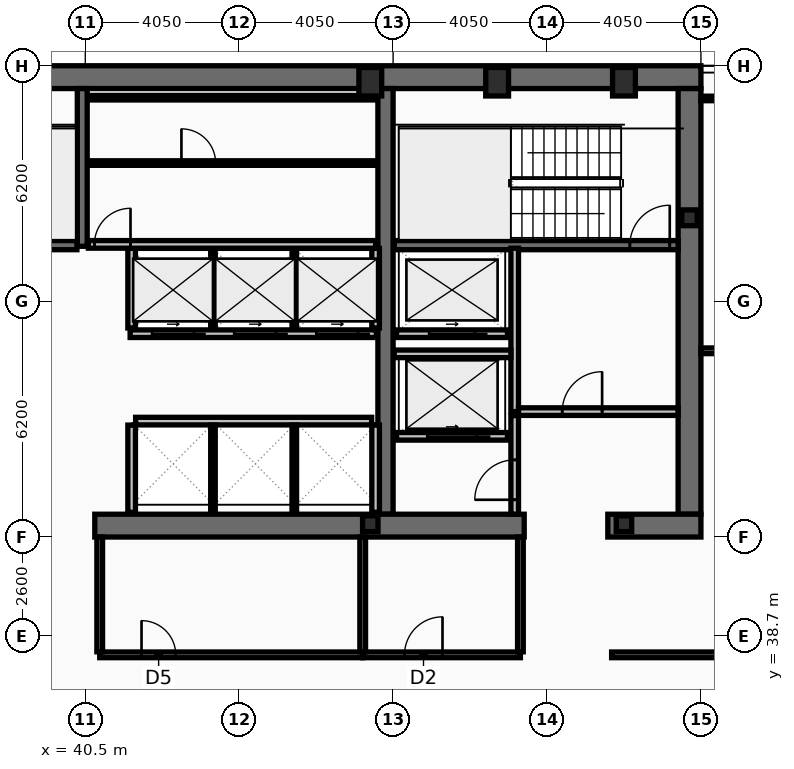
"""IFC4 building model, lengths in metres.
Left out: names, types, materials, properties, quantities, classifications, styles, units other than length and angle.
Written with IfcOpenShell. Run it as: python <this file> out.ifc"""

import sys

from ifc_helpers import new_model, si_unit, direction, frame, frame_2d, origin, origin_2d, place, context, subcontext, project, spatial, rectangle, hollow_rectangle, i_section, extrude, element, fill, save


model = new_model("IFC4")
c1 = context("Model", 3, precision=1e-05, world=origin(), true_north=direction((0.0, 1.0)))
c2 = subcontext(c1, "Body", "Model", "MODEL_VIEW")
j1 = project(units=[si_unit("LENGTHUNIT", "METRE"), si_unit("PLANEANGLEUNIT", "RADIAN")], contexts=[c1])
p1 = place(None, origin())
s1 = spatial("IfcSite", under=j1, at=p1, CompositionType="ELEMENT")
p2 = place(p1, origin())
s2 = spatial("IfcBuilding", under=s1, at=p2, CompositionType="ELEMENT")
p3 = place(p2, frame((0.0, 0.0, 261.8)))
s3 = spatial("IfcBuildingStorey", under=s2, at=p3, CompositionType="ELEMENT", Elevation=261.8)
p4 = place(p3, frame((16.2, 53.4, 0.0), z_axis=(0.0, 0.0, 1.0), x_axis=(1.0, 0.0, 0.0)))
e1 = element("IfcWall", 1, at=p4, inside=s3, PredefinedType="SHEAR", context=c2, shape_type="SweptSolid", body=[
    extrude(rectangle(XDim=40.5, YDim=0.6, at=frame_2d((20.25, 0.0))), origin(), (0.0, 0.0, 1.0), 3.4),
])
p5 = place(p3, frame((56.4, 53.1, 0.0), z_axis=(0.0, 0.0, 1.0), x_axis=(0.0, -1.0, 0.0)))
e2 = element("IfcWall", 2, at=p5, inside=s3, PredefinedType="SHEAR", context=c2, shape_type="SweptSolid", body=[
    extrude(rectangle(XDim=11.2, YDim=0.6, at=frame_2d((5.6, 0.0))), origin(), (0.0, 0.0, 1.0), 3.4),
])
p6 = place(p3, frame((48.4, 41.9, 0.0), z_axis=(0.0, 0.0, 1.0), x_axis=(0.0, 1.0, 0.0)))
e3 = element("IfcWall", 3, at=p6, inside=s3, PredefinedType="SHEAR", context=c2, shape_type="SweptSolid", body=[
    extrude(rectangle(XDim=11.2, YDim=0.4, at=frame_2d((5.6, 0.0))), origin(), (0.0, 0.0, 1.0), 3.4),
])
p7 = place(p3, frame((52.05, 41.6, 0.0), z_axis=(0.0, 0.0, 1.0), x_axis=(-1.0, 0.0, 0.0)))
e4 = element("IfcWall", 4, at=p7, inside=s3, PredefinedType="SHEAR", context=c2, shape_type="SweptSolid", body=[
    extrude(rectangle(XDim=11.3, YDim=0.6, at=frame_2d((5.65, 0.0))), origin(), (0.0, 0.0, 1.0), 3.4),
])
p8 = place(p3, frame((56.7, 41.6, 0.0), z_axis=(0.0, 0.0, 1.0), x_axis=(-1.0, 0.0, 0.0)))
e5 = element("IfcWall", 5, at=p8, inside=s3, PredefinedType="SHEAR", context=c2, shape_type="SweptSolid", body=[
    extrude(rectangle(XDim=2.45, YDim=0.6, at=frame_2d((1.225, 0.0))), origin(), (0.0, 0.0, 1.0), 3.4),
])
p9 = place(p3, frame((40.42, 48.95, 0.0), z_axis=(0.0, 0.0, 1.0), x_axis=(0.0, 1.0, 0.0)))
e6 = element("IfcWall", 6, at=p9, inside=s3, PredefinedType="SHEAR", context=c2, shape_type="SweptSolid", body=[
    extrude(rectangle(XDim=4.15, YDim=0.26, at=frame_2d((2.075, 0.0))), origin(), (0.0, 0.0, 1.0), 3.4),
])
p10 = place(p3, frame((48.63, 48.98, 0.0), z_axis=(0.0, 0.0, 1.0), x_axis=(1.0, 0.0, 0.0)))
e7 = element("IfcWall", 7, at=p10, inside=s3, PredefinedType="SHEAR", context=c2, shape_type="SweptSolid", body=[
    extrude(rectangle(XDim=7.47, YDim=0.24, at=frame_2d((3.735, 0.0))), origin(), (0.0, 0.0, 1.0), 3.4),
])
p11 = place(p10, frame((6.2, 0.0, 0.0)))
e8 = element("IfcOpeningElement", 8, at=p11, cuts=e7, PredefinedType="OPENING", context=c2, shape_type="SweptSolid", body=[
    extrude(rectangle(XDim=1.05, YDim=2.15, at=frame_2d((0.525, 1.075))), frame((0.0, 0.13, 0.0), z_axis=(0.0, -1.0, 0.0), x_axis=(1.0, 0.0, 0.0)), (0.0, 0.0, 1.0), 0.26),
])
p12 = place(p3, frame((32.72, 48.98, 0.0), z_axis=(0.0, 0.0, 1.0), x_axis=(1.0, 0.0, 0.0)))
e9 = element("IfcWall", 9, at=p12, inside=s3, PredefinedType="SHEAR", context=c2, shape_type="SweptSolid", body=[
    extrude(rectangle(XDim=7.56, YDim=0.24, at=frame_2d((3.78, 0.0))), origin(), (0.0, 0.0, 1.0), 3.4),
])
p13 = place(p12, frame((0.22, 0.0, 0.0)))
e10 = element("IfcOpeningElement", 10, at=p13, cuts=e9, PredefinedType="OPENING", context=c2, shape_type="SweptSolid", body=[
    extrude(rectangle(XDim=1.05, YDim=2.15, at=frame_2d((0.525, 1.075))), frame((0.0, 0.13, 0.0), z_axis=(0.0, -1.0, 0.0), x_axis=(1.0, 0.0, 0.0)), (0.0, 0.0, 1.0), 0.26),
])
for number, where, z_axis, x_axis in (
    (11, (48.0, 53.28, 0.0), (0.0, 0.0, 1.0), (1.0, 0.0, 0.0)),
    (12, (51.337, 53.28, 0.0), (0.0, 0.0, 1.0), (1.0, 0.0, 0.0)),
    (13, (54.675, 53.28, 0.0), (0.0, 0.0, 1.0), (1.0, 0.0, 0.0)),
):
    element("IfcColumn", number, at=place(p3, frame(where, z_axis=z_axis, x_axis=x_axis)), inside=s3, PredefinedType="COLUMN", context=c2, shape_type="SweptSolid", body=[
        extrude(hollow_rectangle(XDim=0.6, YDim=0.75, WallThickness=0.045, at=origin_2d()), origin(), (0.0, 0.0, 1.0), 3.6),
    ])
for number, where, z_axis, x_axis in (
    (14, (56.4, 49.7, 0.0), (0.0, 0.0, 1.0), (1.0, 0.0, 0.0)),
    (15, (48.0, 41.65, 0.0), (0.0, 0.0, 1.0), (1.0, 0.0, 0.0)),
    (16, (54.675, 41.65, 0.0), (0.0, 0.0, 1.0), (1.0, 0.0, 0.0)),
):
    element("IfcColumn", number, at=place(p3, frame(where, z_axis=z_axis, x_axis=x_axis)), inside=s3, PredefinedType="COLUMN", context=c2, shape_type="SweptSolid", body=[
        extrude(i_section(OverallWidth=0.406, OverallDepth=0.416, WebThickness=0.03, FlangeThickness=0.048, at=origin_2d()), origin(), (0.0, 0.0, 1.0), 3.6),
    ])
p14 = place(p3, frame((51.61, 43.95, 0.0), z_axis=(0.0, 0.0, 1.0), x_axis=(-1.0, 0.0, 0.0)))
e17 = element("IfcWall", 17, at=p14, inside=s3, PredefinedType="PARTITIONING", context=c2, shape_type="SweptSolid", body=[
    extrude(rectangle(XDim=2.92, YDim=0.2, at=frame_2d((1.46, 0.0))), origin(), (0.0, 0.0, 1.0), 3.4),
])
p15 = place(p14, frame((0.81, 0.0, 0.0)))
e18 = element("IfcOpeningElement", 18, at=p15, cuts=e17, PredefinedType="OPENING", context=c2, shape_type="SweptSolid", body=[
    extrude(rectangle(XDim=1.3, YDim=2.18, at=frame_2d((0.65, 1.09))), frame((0.0, 0.11, 0.0), z_axis=(0.0, -1.0, 0.0), x_axis=(1.0, 0.0, 0.0)), (0.0, 0.0, 1.0), 0.22),
])
p16 = place(p3, frame((51.61, 46.65, 0.0), z_axis=(0.0, 0.0, 1.0), x_axis=(-1.0, 0.0, 0.0)))
e19 = element("IfcWall", 19, at=p16, inside=s3, PredefinedType="PARTITIONING", context=c2, shape_type="SweptSolid", body=[
    extrude(rectangle(XDim=2.92, YDim=0.2, at=frame_2d((1.46, 0.0))), origin(), (0.0, 0.0, 1.0), 3.4),
])
p17 = place(p16, frame((0.86, 0.0, 0.0)))
e20 = element("IfcOpeningElement", 20, at=p17, cuts=e19, PredefinedType="OPENING", context=c2, shape_type="SweptSolid", body=[
    extrude(rectangle(XDim=1.2, YDim=2.18, at=frame_2d((0.6, 1.09))), frame((0.0, 0.11, 0.0), z_axis=(0.0, -1.0, 0.0), x_axis=(1.0, 0.0, 0.0)), (0.0, 0.0, 1.0), 0.22),
])
p18 = place(p3, frame((48.16, 46.65, 0.0), z_axis=(0.0, 0.0, 1.0), x_axis=(-1.0, 0.0, 0.0)))
e21 = element("IfcWall", 21, at=p18, inside=s3, PredefinedType="PARTITIONING", context=c2, shape_type="SweptSolid", body=[
    extrude(rectangle(XDim=6.48, YDim=0.2, at=frame_2d((3.24, 0.0))), origin(), (0.0, 0.0, 1.0), 3.4),
])
p19 = place(p18, frame((4.8, 0.0, 0.0)))
e22 = element("IfcOpeningElement", 22, at=p19, cuts=e21, PredefinedType="OPENING", context=c2, shape_type="SweptSolid", body=[
    extrude(rectangle(XDim=1.1, YDim=2.18, at=frame_2d((0.55, 1.09))), frame((0.0, 0.11, 0.0), z_axis=(0.0, -1.0, 0.0), x_axis=(1.0, 0.0, 0.0)), (0.0, 0.0, 1.0), 0.22),
])
p20 = place(p18, frame((2.64, 0.0, 0.0)))
e23 = element("IfcOpeningElement", 23, at=p20, cuts=e21, PredefinedType="OPENING", context=c2, shape_type="SweptSolid", body=[
    extrude(rectangle(XDim=1.1, YDim=2.18, at=frame_2d((0.55, 1.09))), frame((0.0, 0.11, 0.0), z_axis=(0.0, -1.0, 0.0), x_axis=(1.0, 0.0, 0.0)), (0.0, 0.0, 1.0), 0.22),
])
p21 = place(p18, frame((0.48, 0.0, 0.0)))
e24 = element("IfcOpeningElement", 24, at=p21, cuts=e21, PredefinedType="OPENING", context=c2, shape_type="SweptSolid", body=[
    extrude(rectangle(XDim=1.1, YDim=2.18, at=frame_2d((0.55, 1.09))), frame((0.0, 0.11, 0.0), z_axis=(0.0, -1.0, 0.0), x_axis=(1.0, 0.0, 0.0)), (0.0, 0.0, 1.0), 0.22),
])
p22 = place(p3, frame((51.8, 44.6, 0.0), z_axis=(0.0, 0.0, 1.0), x_axis=(0.0, 1.0, 0.0)))
e25 = element("IfcWall", 25, at=p22, inside=s3, PredefinedType="PARTITIONING", context=c2, shape_type="SweptSolid", body=[
    extrude(rectangle(XDim=4.3, YDim=0.2, at=frame_2d((2.15, 0.0))), origin(), (0.0, 0.0, 1.0), 3.4),
])
p23 = place(p3, frame((51.9, 44.6, 0.0), z_axis=(0.0, 0.0, 1.0), x_axis=(1.0, 0.0, 0.0)))
e26 = element("IfcWall", 26, at=p23, inside=s3, PredefinedType="PARTITIONING", context=c2, shape_type="SweptSolid", body=[
    extrude(rectangle(XDim=4.2, YDim=0.2, at=frame_2d((2.1, 0.0))), origin(), (0.0, 0.0, 1.0), 3.4),
])
p24 = place(p23, frame((1.15, 0.0, 0.0)))
e27 = element("IfcOpeningElement", 27, at=p24, cuts=e26, PredefinedType="OPENING", context=c2, shape_type="SweptSolid", body=[
    extrude(rectangle(XDim=1.05, YDim=2.15, at=frame_2d((0.525, 1.075))), frame((0.0, 0.11, 0.0), z_axis=(0.0, -1.0, 0.0), x_axis=(1.0, 0.0, 0.0)), (0.0, 0.0, 1.0), 0.22),
])
p25 = place(p3, frame((48.63, 46.12, 0.0), z_axis=(0.0, 0.0, 1.0), x_axis=(1.0, 0.0, 0.0)))
e28 = element("IfcWall", 28, at=p25, inside=s3, PredefinedType="PARTITIONING", context=c2, shape_type="SweptSolid", body=[
    extrude(rectangle(XDim=3.07, YDim=0.2, at=frame_2d((1.535, 0.0))), origin(), (0.0, 0.0, 1.0), 3.4),
])
p26 = place(p3, frame((51.8, 41.9, 0.0), z_axis=(0.0, 0.0, 1.0), x_axis=(0.0, 1.0, 0.0)))
e29 = element("IfcWall", 29, at=p26, inside=s3, PredefinedType="PARTITIONING", context=c2, shape_type="SweptSolid", body=[
    extrude(rectangle(XDim=2.595, YDim=0.2, at=frame_2d((1.298, 0.0))), origin(), (0.0, 0.0, 1.0), 3.4),
])
p27 = place(p26, frame((0.38, 0.0, 0.0)))
e30 = element("IfcOpeningElement", 30, at=p27, cuts=e29, PredefinedType="OPENING", context=c2, shape_type="SweptSolid", body=[
    extrude(rectangle(XDim=1.05, YDim=2.15, at=frame_2d((0.525, 1.075))), frame((0.0, 0.11, 0.0), z_axis=(0.0, -1.0, 0.0), x_axis=(1.0, 0.0, 0.0)), (0.0, 0.0, 1.0), 0.22),
])
for number, where, z_axis, x_axis in (
    (31, (41.72, 46.8, 0.0), (0.0, 0.0, 1.0), (0.0, 1.0, 0.0)),
    (32, (48.14, 46.8, 0.0), (0.0, 0.0, 1.0), (0.0, 1.0, 0.0)),
):
    element("IfcWall", number, at=place(p3, frame(where, z_axis=z_axis, x_axis=x_axis)), inside=s3, PredefinedType="PARTITIONING", context=c2, shape_type="SweptSolid", body=[
        extrude(rectangle(XDim=2.095, YDim=0.2, at=frame_2d((1.047, 0.0))), origin(), (0.0, 0.0, 1.0), 3.4),
    ])
for number, where, z_axis, x_axis in (
    (33, (43.86, 46.8, 0.0), (0.0, 0.0, 1.0), (0.0, 1.0, 0.0)),
    (34, (46.0, 46.8, 0.0), (0.0, 0.0, 1.0), (0.0, 1.0, 0.0)),
):
    element("IfcWall", number, at=place(p3, frame(where, z_axis=z_axis, x_axis=x_axis)), inside=s3, PredefinedType="PARTITIONING", context=c2, shape_type="SweptSolid", body=[
        extrude(rectangle(XDim=2.095, YDim=0.12, at=frame_2d((1.047, 0.0))), origin(), (0.0, 0.0, 1.0), 3.4),
    ])
p28 = place(p3, frame((41.825, 44.35, 0.0), z_axis=(0.0, 0.0, 1.0), x_axis=(1.0, 0.0, 0.0)))
e35 = element("IfcWall", 35, at=p28, inside=s3, PredefinedType="PARTITIONING", context=c2, shape_type="SweptSolid", body=[
    extrude(rectangle(XDim=6.21, YDim=0.2, at=frame_2d((3.105, 0.0))), origin(), (0.0, 0.0, 1.0), 3.4),
])
for number, where, z_axis, x_axis in (
    (36, (41.72, 41.95, 0.0), (0.0, 0.0, 1.0), (0.0, 1.0, 0.0)),
    (37, (48.14, 41.95, 0.0), (0.0, 0.0, 1.0), (0.0, 1.0, 0.0)),
):
    element("IfcWall", number, at=place(p3, frame(where, z_axis=z_axis, x_axis=x_axis)), inside=s3, PredefinedType="PARTITIONING", context=c2, shape_type="SweptSolid", body=[
        extrude(rectangle(XDim=2.295, YDim=0.2, at=frame_2d((1.147, 0.0))), origin(), (0.0, 0.0, 1.0), 3.4),
    ])
for number, where, z_axis, x_axis in (
    (38, (43.86, 41.95, 0.0), (0.0, 0.0, 1.0), (0.0, 1.0, 0.0)),
    (39, (46.0, 41.95, 0.0), (0.0, 0.0, 1.0), (0.0, 1.0, 0.0)),
):
    element("IfcWall", number, at=place(p3, frame(where, z_axis=z_axis, x_axis=x_axis)), inside=s3, PredefinedType="PARTITIONING", context=c2, shape_type="SweptSolid", body=[
        extrude(rectangle(XDim=2.295, YDim=0.12, at=frame_2d((1.147, 0.0))), origin(), (0.0, 0.0, 1.0), 3.4),
    ])
p29 = place(p3, frame((40.58, 52.86, 0.0), z_axis=(0.0, 0.0, 1.0), x_axis=(1.0, 0.0, 0.0)))
e40 = element("IfcWall", 40, at=p29, inside=s3, PredefinedType="PARTITIONING", context=c2, shape_type="SweptSolid", body=[
    extrude(rectangle(XDim=7.56, YDim=0.12, at=frame_2d((3.78, 0.0))), origin(), (0.0, 0.0, 1.0), 3.4),
])
p30 = place(p3, frame((40.58, 49.0, 0.0), z_axis=(0.0, 0.0, 1.0), x_axis=(1.0, 0.0, 0.0)))
e41 = element("IfcWall", 41, at=p30, inside=s3, PredefinedType="PARTITIONING", context=c2, shape_type="SweptSolid", body=[
    extrude(rectangle(XDim=7.56, YDim=0.2, at=frame_2d((3.78, 0.0))), origin(), (0.0, 0.0, 1.0), 3.4),
])
p31 = place(p30, frame((0.16, 0.0, 0.0)))
e42 = element("IfcOpeningElement", 42, at=p31, cuts=e41, PredefinedType="OPENING", context=c2, shape_type="SweptSolid", body=[
    extrude(rectangle(XDim=0.95, YDim=2.1, at=frame_2d((0.475, 1.05))), frame((0.0, 0.11, 0.0), z_axis=(0.0, -1.0, 0.0), x_axis=(1.0, 0.0, 0.0)), (0.0, 0.0, 1.0), 0.22),
])
p32 = place(p3, frame((40.63, 51.14, 0.0), z_axis=(0.0, 0.0, 1.0), x_axis=(1.0, 0.0, 0.0)))
e43 = element("IfcWall", 43, at=p32, inside=s3, PredefinedType="PARTITIONING", context=c2, shape_type="SweptSolid", body=[
    extrude(rectangle(XDim=7.46, YDim=0.12, at=frame_2d((3.73, 0.0))), origin(), (0.0, 0.0, 1.0), 3.4),
])
p33 = place(p32, frame((2.4, 0.0, 0.0)))
e44 = element("IfcOpeningElement", 44, at=p33, cuts=e43, PredefinedType="OPENING", context=c2, shape_type="SweptSolid", body=[
    extrude(rectangle(XDim=0.9, YDim=2.05, at=frame_2d((0.45, 1.025))), frame((0.0, 0.07, 0.0), z_axis=(0.0, -1.0, 0.0), x_axis=(1.0, 0.0, 0.0)), (0.0, 0.0, 1.0), 0.14),
])
p34 = place(p3, frame((40.88, 38.2, 0.0), z_axis=(0.0, 0.0, 1.0), x_axis=(1.0, 0.0, 0.0)))
e45 = element("IfcWall", 45, at=p34, inside=s3, PredefinedType="PARTITIONING", context=c2, shape_type="SweptSolid", body=[
    extrude(rectangle(XDim=6.92, YDim=0.15, at=frame_2d((3.46, 0.0))), origin(), (0.0, 0.0, 1.0), 2.74),
])
p35 = place(p34, frame((1.1, 0.0, 0.0)))
e46 = element("IfcOpeningElement", 46, at=p35, cuts=e45, PredefinedType="OPENING", context=c2, shape_type="SweptSolid", body=[
    extrude(rectangle(XDim=0.9, YDim=2.05, at=frame_2d((0.45, 1.025))), frame((0.0, 0.085, 0.0), z_axis=(0.0, -1.0, 0.0), x_axis=(1.0, 0.0, 0.0)), (0.0, 0.0, 1.0), 0.17),
])
p36 = place(p3, frame((47.8, 38.2, 0.0), z_axis=(0.0, 0.0, 1.0), x_axis=(1.0, 0.0, 0.0)))
e47 = element("IfcWall", 47, at=p36, inside=s3, PredefinedType="PARTITIONING", context=c2, shape_type="SweptSolid", body=[
    extrude(rectangle(XDim=4.15, YDim=0.15, at=frame_2d((2.075, 0.0))), origin(), (0.0, 0.0, 1.0), 2.74),
])
p37 = place(p36, frame((1.1, 0.0, 0.0)))
e48 = element("IfcOpeningElement", 48, at=p37, cuts=e47, PredefinedType="OPENING", context=c2, shape_type="SweptSolid", body=[
    extrude(rectangle(XDim=1.0, YDim=2.05, at=frame_2d((0.5, 1.025))), frame((0.0, 0.085, 0.0), z_axis=(0.0, -1.0, 0.0), x_axis=(1.0, 0.0, 0.0)), (0.0, 0.0, 1.0), 0.17),
])
p38 = place(p3, frame((40.88, 38.28, 0.0), z_axis=(0.0, 0.0, 1.0), x_axis=(0.0, 1.0, 0.0)))
e49 = element("IfcWall", 49, at=p38, inside=s3, PredefinedType="PARTITIONING", context=c2, shape_type="SweptSolid", body=[
    extrude(rectangle(XDim=3.02, YDim=0.15, at=frame_2d((1.51, 0.0))), origin(), (0.0, 0.0, 1.0), 3.4),
])
p39 = place(p3, frame((47.8, 38.28, 0.0), z_axis=(0.0, 0.0, 1.0), x_axis=(0.0, 1.0, 0.0)))
e50 = element("IfcWall", 50, at=p39, inside=s3, PredefinedType="PARTITIONING", context=c2, shape_type="SweptSolid", body=[
    extrude(rectangle(XDim=3.02, YDim=0.15, at=frame_2d((1.51, 0.0))), origin(), (0.0, 0.0, 1.0), 2.74),
])
p40 = place(p3, frame((51.95, 38.28, 0.0), z_axis=(0.0, 0.0, 1.0), x_axis=(0.0, 1.0, 0.0)))
e51 = element("IfcWall", 51, at=p40, inside=s3, PredefinedType="PARTITIONING", context=c2, shape_type="SweptSolid", body=[
    extrude(rectangle(XDim=3.02, YDim=0.15, at=frame_2d((1.51, 0.0))), origin(), (0.0, 0.0, 1.0), 3.4),
])
p41 = place(p3, frame((54.35, 38.2, 0.0), z_axis=(0.0, 0.0, 1.0), x_axis=(1.0, 0.0, 0.0)))
e52 = element("IfcWall", 52, at=p41, inside=s3, PredefinedType="PARTITIONING", context=c2, shape_type="SweptSolid", body=[
    extrude(rectangle(XDim=8.52, YDim=0.15, at=frame_2d((4.26, 0.0))), origin(), (0.0, 0.0, 1.0), 2.74),
])
p42 = place(p41, frame((3.25, 0.0, 0.0)))
e53 = element("IfcOpeningElement", 53, at=p42, cuts=e52, PredefinedType="OPENING", context=c2, shape_type="SweptSolid", body=[
    extrude(rectangle(XDim=0.95, YDim=2.05, at=frame_2d((0.475, 1.025))), frame((0.0, 0.085, 0.0), z_axis=(0.0, -1.0, 0.0), x_axis=(1.0, 0.0, 0.0)), (0.0, 0.0, 1.0), 0.17),
])
p43 = place(p3, frame((56.7, 46.2, 0.0), z_axis=(0.0, 0.0, 1.0), x_axis=(1.0, 0.0, 0.0)))
e54 = element("IfcWall", 54, at=p43, inside=s3, PredefinedType="PARTITIONING", context=c2, shape_type="SweptSolid", body=[
    extrude(rectangle(XDim=6.105, YDim=0.15, at=frame_2d((3.052, 0.0))), origin(), (0.0, 0.0, 1.0), 2.79),
])
p44 = place(p43, frame((0.9, 0.0, 0.0)))
e55 = element("IfcOpeningElement", 55, at=p44, cuts=e54, PredefinedType="OPENING", context=c2, shape_type="SweptSolid", body=[
    extrude(rectangle(XDim=0.9, YDim=2.05, at=frame_2d((0.45, 1.025))), frame((0.0, 0.085, 0.0), z_axis=(0.0, -1.0, 0.0), x_axis=(1.0, 0.0, 0.0)), (0.0, 0.0, 1.0), 0.17),
])
p45 = place(p3, frame((56.7, 52.84, 0.0), z_axis=(0.0, 0.0, 1.0), x_axis=(1.0, 0.0, 0.0)))
e56 = element("IfcWall", 56, at=p45, inside=s3, PredefinedType="PARTITIONING", context=c2, shape_type="SweptSolid", body=[
    extrude(rectangle(XDim=6.105, YDim=0.12, at=frame_2d((3.052, 0.0))), origin(), (0.0, 0.0, 1.0), 3.4),
])
p46 = place(p11, origin())
e57 = element("IfcDoor", 57, at=p46, inside=s3, OperationType="SINGLE_SWING_RIGHT", PredefinedType="DOOR", context=c2, shape_type="SweptSolid", body=[
    extrude(rectangle(XDim=1.05, YDim=2.15, at=frame_2d((0.525, 1.075))), frame((0.0, 0.025, 0.0), z_axis=(0.0, -1.0, 0.0), x_axis=(1.0, 0.0, 0.0)), (0.0, 0.0, 1.0), 0.05),
])
fill(e8, e57)
p47 = place(p15, origin())
e58 = element("IfcDoor", 58, at=p47, inside=s3, OperationType="SLIDING_TO_LEFT", PredefinedType="DOOR", context=c2, shape_type="SweptSolid", body=[
    extrude(rectangle(XDim=1.3, YDim=2.18, at=frame_2d((0.65, 1.09))), frame((0.0, 0.025, 0.0), z_axis=(0.0, -1.0, 0.0), x_axis=(1.0, 0.0, 0.0)), (0.0, 0.0, 1.0), 0.05),
])
fill(e18, e58)
p48 = place(p17, origin())
e59 = element("IfcDoor", 59, at=p48, inside=s3, OperationType="SLIDING_TO_LEFT", PredefinedType="DOOR", context=c2, shape_type="SweptSolid", body=[
    extrude(rectangle(XDim=1.2, YDim=2.18, at=frame_2d((0.6, 1.09))), frame((0.0, 0.025, 0.0), z_axis=(0.0, -1.0, 0.0), x_axis=(1.0, 0.0, 0.0)), (0.0, 0.0, 1.0), 0.05),
])
fill(e20, e59)
p49 = place(p19, origin())
e60 = element("IfcDoor", 60, at=p49, inside=s3, OperationType="SLIDING_TO_LEFT", PredefinedType="DOOR", context=c2, shape_type="SweptSolid", body=[
    extrude(rectangle(XDim=1.1, YDim=2.18, at=frame_2d((0.55, 1.09))), frame((0.0, 0.025, 0.0), z_axis=(0.0, -1.0, 0.0), x_axis=(1.0, 0.0, 0.0)), (0.0, 0.0, 1.0), 0.05),
])
fill(e22, e60)
p50 = place(p20, origin())
e61 = element("IfcDoor", 61, at=p50, inside=s3, OperationType="SLIDING_TO_LEFT", PredefinedType="DOOR", context=c2, shape_type="SweptSolid", body=[
    extrude(rectangle(XDim=1.1, YDim=2.18, at=frame_2d((0.55, 1.09))), frame((0.0, 0.025, 0.0), z_axis=(0.0, -1.0, 0.0), x_axis=(1.0, 0.0, 0.0)), (0.0, 0.0, 1.0), 0.05),
])
fill(e23, e61)
p51 = place(p21, origin())
e62 = element("IfcDoor", 62, at=p51, inside=s3, OperationType="SLIDING_TO_LEFT", PredefinedType="DOOR", context=c2, shape_type="SweptSolid", body=[
    extrude(rectangle(XDim=1.1, YDim=2.18, at=frame_2d((0.55, 1.09))), frame((0.0, 0.025, 0.0), z_axis=(0.0, -1.0, 0.0), x_axis=(1.0, 0.0, 0.0)), (0.0, 0.0, 1.0), 0.05),
])
fill(e24, e62)
p52 = place(p24, origin())
e63 = element("IfcDoor", 63, at=p52, inside=s3, OperationType="SINGLE_SWING_RIGHT", PredefinedType="DOOR", context=c2, shape_type="SweptSolid", body=[
    extrude(rectangle(XDim=1.05, YDim=2.15, at=frame_2d((0.525, 1.075))), frame((0.0, 0.025, 0.0), z_axis=(0.0, -1.0, 0.0), x_axis=(1.0, 0.0, 0.0)), (0.0, 0.0, 1.0), 0.05),
])
fill(e27, e63)
p53 = place(p27, origin())
e64 = element("IfcDoor", 64, at=p53, inside=s3, OperationType="SINGLE_SWING_LEFT", PredefinedType="DOOR", context=c2, shape_type="SweptSolid", body=[
    extrude(rectangle(XDim=1.05, YDim=2.15, at=frame_2d((0.525, 1.075))), frame((0.0, 0.025, 0.0), z_axis=(0.0, -1.0, 0.0), x_axis=(1.0, 0.0, 0.0)), (0.0, 0.0, 1.0), 0.05),
])
fill(e30, e64)
p54 = place(p31, origin())
e65 = element("IfcDoor", 65, at=p54, inside=s3, OperationType="SINGLE_SWING_RIGHT", PredefinedType="DOOR", context=c2, shape_type="SweptSolid", body=[
    extrude(rectangle(XDim=0.95, YDim=2.1, at=frame_2d((0.475, 1.05))), frame((0.0, 0.025, 0.0), z_axis=(0.0, -1.0, 0.0), x_axis=(1.0, 0.0, 0.0)), (0.0, 0.0, 1.0), 0.05),
])
fill(e42, e65)
p55 = place(p33, origin())
e66 = element("IfcDoor", 66, at=p55, inside=s3, OperationType="SINGLE_SWING_LEFT", PredefinedType="DOOR", context=c2, shape_type="SweptSolid", body=[
    extrude(rectangle(XDim=0.9, YDim=2.05, at=frame_2d((0.45, 1.025))), frame((0.0, 0.025, 0.0), z_axis=(0.0, -1.0, 0.0), x_axis=(1.0, 0.0, 0.0)), (0.0, 0.0, 1.0), 0.05),
])
fill(e44, e66)
p56 = place(p35, origin())
e67 = element("IfcDoor", 67, at=p56, inside=s3, OperationType="SINGLE_SWING_LEFT", PredefinedType="DOOR", context=c2, shape_type="SweptSolid", body=[
    extrude(rectangle(XDim=0.9, YDim=2.05, at=frame_2d((0.45, 1.025))), frame((0.0, 0.025, 0.0), z_axis=(0.0, -1.0, 0.0), x_axis=(1.0, 0.0, 0.0)), (0.0, 0.0, 1.0), 0.05),
])
fill(e46, e67)
p57 = place(p37, origin())
e68 = element("IfcDoor", 68, at=p57, inside=s3, OperationType="SINGLE_SWING_RIGHT", PredefinedType="DOOR", context=c2, shape_type="SweptSolid", body=[
    extrude(rectangle(XDim=1.0, YDim=2.05, at=frame_2d((0.5, 1.025))), frame((0.0, 0.025, 0.0), z_axis=(0.0, -1.0, 0.0), x_axis=(1.0, 0.0, 0.0)), (0.0, 0.0, 1.0), 0.05),
])
fill(e48, e68)
save(model, sys.argv[1])
